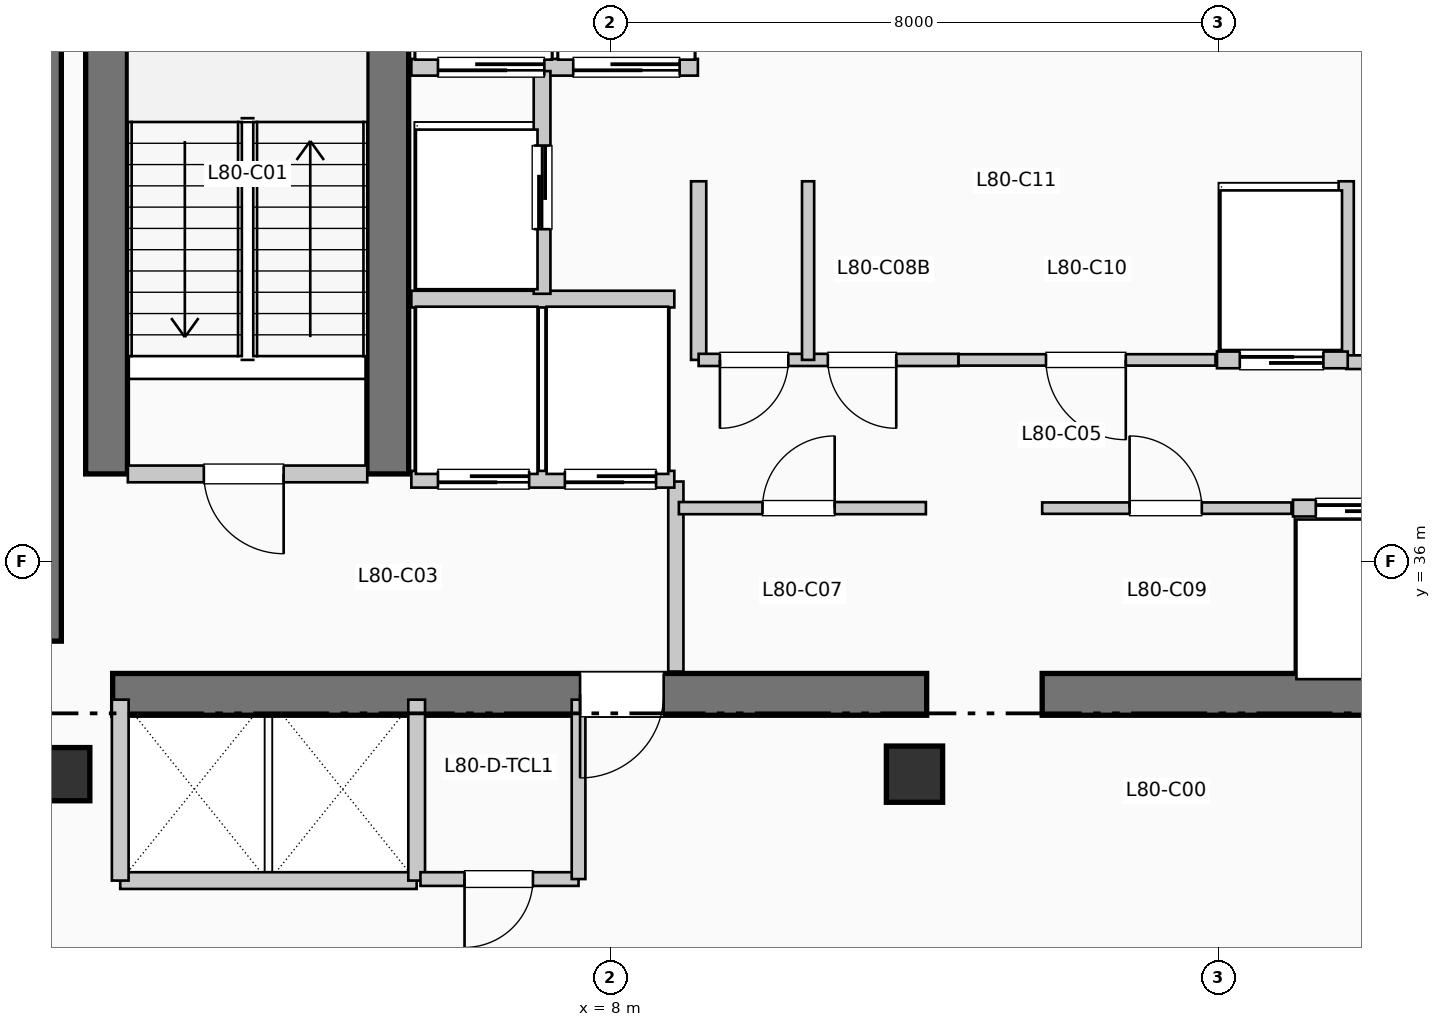
"""IFC4 building model, lengths in metres.
Left out: names, types, materials, properties, quantities, classifications, styles, units other than length and angle.
Written with IfcOpenShell. Run it as: python <this file> out.ifc"""

import sys

from ifc_helpers import new_model, si_unit, direction, frame, frame_2d, origin, origin_2d, place, context, subcontext, project, spatial, rectangle, extrude, element, fill, save


model = new_model("IFC4")
c1 = context("Model", 3, precision=1e-05, world=origin(), true_north=direction((0.0, 1.0)))
c2 = subcontext(c1, "Body", "Model", "MODEL_VIEW")
j1 = project(units=[si_unit("LENGTHUNIT", "METRE"), si_unit("PLANEANGLEUNIT", "RADIAN")], contexts=[c1])
p1 = place(None, origin())
s1 = spatial("IfcSite", under=j1, at=p1, CompositionType="ELEMENT")
p2 = place(p1, origin())
s2 = spatial("IfcBuilding", under=s1, at=p2, CompositionType="ELEMENT")
p3 = place(p2, frame((0.0, 0.0, 327.69)))
s3 = spatial("IfcBuildingStorey", under=s2, at=p3, CompositionType="ELEMENT", Elevation=327.69)
p4 = place(p3, frame((0.5, 34.95, 0.0), z_axis=(0.0, 0.0, 1.0), x_axis=(0.0, 1.0, 0.0)))
e1 = element("IfcWall", 1, at=p4, inside=s3, PredefinedType="SHEAR", context=c2, shape_type="SweptSolid", body=[
    extrude(rectangle(XDim=7.9, YDim=0.55, at=frame_2d((3.95, 0.0))), origin(), (0.0, 0.0, 1.0), 3.96),
])
p5 = place(p3, frame((1.45, 34.25, 0.0), z_axis=(0.0, 0.0, 1.0), x_axis=(1.0, 0.0, 0.0)))
e2 = element("IfcWall", 2, at=p5, inside=s3, PredefinedType="SHEAR", context=c2, shape_type="SweptSolid", body=[
    extrude(rectangle(XDim=10.71, YDim=0.55, at=frame_2d((5.355, 0.0))), origin(), (0.0, 0.0, 1.0), 3.96),
])
p6 = place(p5, frame((7.25, 0.0, 0.0), z_axis=(0.0, 0.0, 1.0), x_axis=(-1.0, 0.0, 0.0)))
e3 = element("IfcOpeningElement", 3, at=p6, cuts=e2, PredefinedType="OPENING", context=c2, shape_type="SweptSolid", body=[
    extrude(rectangle(XDim=1.1, YDim=2.15, at=frame_2d((0.55, 1.075))), frame((0.0, 0.285, 0.0), z_axis=(0.0, -1.0, 0.0), x_axis=(1.0, 0.0, 0.0)), (0.0, 0.0, 1.0), 0.57),
])
p7 = place(p3, frame((13.68, 34.25, 0.0), z_axis=(0.0, 0.0, 1.0), x_axis=(1.0, 0.0, 0.0)))
e4 = element("IfcWall", 4, at=p7, inside=s3, PredefinedType="SHEAR", context=c2, shape_type="SweptSolid", body=[
    extrude(rectangle(XDim=6.12, YDim=0.55, at=frame_2d((3.06, 0.0))), origin(), (0.0, 0.0, 1.0), 3.96),
])
for number, where, z_axis, x_axis in (
    (5, (1.37, 37.15, 0.0), (0.0, 0.0, 1.0), (0.0, 1.0, 0.0)),
    (6, (5.07, 37.15, 0.0), (0.0, 0.0, 1.0), (0.0, 1.0, 0.0)),
):
    element("IfcWall", number, at=place(p3, frame(where, z_axis=z_axis, x_axis=x_axis)), inside=s3, PredefinedType="SHEAR", context=c2, shape_type="SweptSolid", body=[
        extrude(rectangle(XDim=7.89, YDim=0.55, at=frame_2d((3.945, 0.0))), origin(), (0.0, 0.0, 1.0), 3.96),
    ])
p8 = place(p3, frame((0.8, 33.2, 0.0), z_axis=(0.0, 0.0, 1.0), x_axis=(1.0, 0.0, 0.0)))
e7 = element("IfcColumn", 7, at=p8, inside=s3, PredefinedType="COLUMN", context=c2, shape_type="SweptSolid", body=[
    extrude(rectangle(XDim=0.7, YDim=0.7, at=origin_2d()), origin(), (0.0, 0.0, 1.0), 3.96),
])
p9 = place(p3, frame((12.0, 33.2, 0.0), z_axis=(0.0, 0.0, 1.0), x_axis=(1.0, 0.0, 0.0)))
e8 = element("IfcColumn", 8, at=p9, inside=s3, PredefinedType="COLUMN", context=c2, shape_type="SweptSolid", body=[
    extrude(rectangle(XDim=0.74, YDim=0.74, at=origin_2d()), origin(), (0.0, 0.0, 1.0), 3.96),
])
p10 = place(p3, frame((1.65, 37.15, 0.0), z_axis=(0.0, 0.0, 1.0), x_axis=(1.0, 0.0, 0.0)))
e9 = element("IfcWall", 9, at=p10, inside=s3, PredefinedType="PARTITIONING", context=c2, shape_type="SweptSolid", body=[
    extrude(rectangle(XDim=3.15, YDim=0.22, at=frame_2d((1.575, 0.0))), origin(), (0.0, 0.0, 1.0), 3.74),
])
p11 = place(p10, frame((2.05, 0.0, 0.0), z_axis=(0.0, 0.0, 1.0), x_axis=(-1.0, 0.0, 0.0)))
e10 = element("IfcOpeningElement", 10, at=p11, cuts=e9, PredefinedType="OPENING", context=c2, shape_type="SweptSolid", body=[
    extrude(rectangle(XDim=1.05, YDim=2.15, at=frame_2d((0.525, 1.075))), frame((0.0, 0.12, 0.0), z_axis=(0.0, -1.0, 0.0), x_axis=(1.0, 0.0, 0.0)), (0.0, 0.0, 1.0), 0.24),
])
p12 = place(p3, frame((8.86, 34.55, 0.0), z_axis=(0.0, 0.0, 1.0), x_axis=(0.0, 1.0, 0.0)))
e11 = element("IfcWall", 11, at=p12, inside=s3, PredefinedType="PARTITIONING", context=c2, shape_type="SweptSolid", body=[
    extrude(rectangle(XDim=2.5, YDim=0.2, at=frame_2d((1.25, 0.0))), origin(), (0.0, 0.0, 1.0), 3.74),
])
p13 = place(p3, frame((5.38, 37.08, 0.0), z_axis=(0.0, 0.0, 1.0), x_axis=(1.0, 0.0, 0.0)))
e12 = element("IfcWall", 12, at=p13, inside=s3, PredefinedType="PARTITIONING", context=c2, shape_type="SweptSolid", body=[
    extrude(rectangle(XDim=3.46, YDim=0.22, at=frame_2d((1.73, 0.0))), origin(), (0.0, 0.0, 1.0), 3.74),
])
p14 = place(p13, frame((1.55, 0.0, 0.0), z_axis=(0.0, 0.0, 1.0), x_axis=(-1.0, 0.0, 0.0)))
e13 = element("IfcOpeningElement", 13, at=p14, cuts=e12, PredefinedType="OPENING", context=c2, shape_type="SweptSolid", body=[
    extrude(rectangle(XDim=1.2, YDim=2.2, at=frame_2d((0.6, 1.1))), frame((0.0, 0.12, 0.0), z_axis=(0.0, -1.0, 0.0), x_axis=(1.0, 0.0, 0.0)), (0.0, 0.0, 1.0), 0.24),
])
p15 = place(p13, frame((3.22, 0.0, 0.0), z_axis=(0.0, 0.0, 1.0), x_axis=(-1.0, 0.0, 0.0)))
e14 = element("IfcOpeningElement", 14, at=p15, cuts=e12, PredefinedType="OPENING", context=c2, shape_type="SweptSolid", body=[
    extrude(rectangle(XDim=1.2, YDim=2.2, at=frame_2d((0.6, 1.1))), frame((0.0, 0.12, 0.0), z_axis=(0.0, -1.0, 0.0), x_axis=(1.0, 0.0, 0.0)), (0.0, 0.0, 1.0), 0.24),
])
p16 = place(p3, frame((5.38, 39.45, 0.0), z_axis=(0.0, 0.0, 1.0), x_axis=(1.0, 0.0, 0.0)))
e15 = element("IfcWall", 15, at=p16, inside=s3, PredefinedType="PARTITIONING", context=c2, shape_type="SweptSolid", body=[
    extrude(rectangle(XDim=3.46, YDim=0.22, at=frame_2d((1.73, 0.0))), origin(), (0.0, 0.0, 1.0), 3.74),
])
p17 = place(p3, frame((5.38, 42.5, 0.0), z_axis=(0.0, 0.0, 1.0), x_axis=(1.0, 0.0, 0.0)))
e16 = element("IfcWall", 16, at=p17, inside=s3, PredefinedType="PARTITIONING", context=c2, shape_type="SweptSolid", body=[
    extrude(rectangle(XDim=3.77, YDim=0.22, at=frame_2d((1.885, 0.0))), origin(), (0.0, 0.0, 1.0), 3.74),
])
p18 = place(p17, frame((1.75, 0.0, 0.0), z_axis=(0.0, 0.0, 1.0), x_axis=(-1.0, 0.0, 0.0)))
e17 = element("IfcOpeningElement", 17, at=p18, cuts=e16, PredefinedType="OPENING", context=c2, shape_type="SweptSolid", body=[
    extrude(rectangle(XDim=1.4, YDim=2.2, at=frame_2d((0.7, 1.1))), frame((0.0, 0.12, 0.0), z_axis=(0.0, -1.0, 0.0), x_axis=(1.0, 0.0, 0.0)), (0.0, 0.0, 1.0), 0.24),
])
p19 = place(p17, frame((3.53, 0.0, 0.0), z_axis=(0.0, 0.0, 1.0), x_axis=(-1.0, 0.0, 0.0)))
e18 = element("IfcOpeningElement", 18, at=p19, cuts=e16, PredefinedType="OPENING", context=c2, shape_type="SweptSolid", body=[
    extrude(rectangle(XDim=1.4, YDim=2.2, at=frame_2d((0.7, 1.1))), frame((0.0, 0.12, 0.0), z_axis=(0.0, -1.0, 0.0), x_axis=(1.0, 0.0, 0.0)), (0.0, 0.0, 1.0), 0.24),
])
p20 = place(p3, frame((7.1, 39.52, 0.0), z_axis=(0.0, 0.0, 1.0), x_axis=(0.0, 1.0, 0.0)))
e19 = element("IfcWall", 19, at=p20, inside=s3, PredefinedType="PARTITIONING", context=c2, shape_type="SweptSolid", body=[
    extrude(rectangle(XDim=2.93, YDim=0.22, at=frame_2d((1.465, 0.0))), origin(), (0.0, 0.0, 1.0), 3.74),
])
p21 = place(p20, frame((0.85, 0.0, 0.0)))
e20 = element("IfcOpeningElement", 20, at=p21, cuts=e19, PredefinedType="OPENING", context=c2, shape_type="SweptSolid", body=[
    extrude(rectangle(XDim=1.1, YDim=2.2, at=frame_2d((0.55, 1.1))), frame((0.0, 0.12, 0.0), z_axis=(0.0, -1.0, 0.0), x_axis=(1.0, 0.0, 0.0)), (0.0, 0.0, 1.0), 0.24),
])
p22 = place(p3, frame((1.55, 31.8, 0.0), z_axis=(0.0, 0.0, 1.0), x_axis=(1.0, 0.0, 0.0)))
e21 = element("IfcWall", 21, at=p22, inside=s3, PredefinedType="PARTITIONING", context=c2, shape_type="SweptSolid", body=[
    extrude(rectangle(XDim=3.9, YDim=0.22, at=frame_2d((1.95, 0.0))), origin(), (0.0, 0.0, 1.0), 3.74),
])
for number, where, z_axis, x_axis in (
    (22, (1.55, 31.8, 0.0), (0.0, 0.0, 1.0), (0.0, 1.0, 0.0)),
    (23, (5.45, 31.8, 0.0), (0.0, 0.0, 1.0), (0.0, 1.0, 0.0)),
):
    element("IfcWall", number, at=place(p3, frame(where, z_axis=z_axis, x_axis=x_axis)), inside=s3, PredefinedType="PARTITIONING", context=c2, shape_type="SweptSolid", body=[
        extrude(rectangle(XDim=2.38, YDim=0.22, at=frame_2d((1.19, 0.0))), origin(), (0.0, 0.0, 1.0), 3.74),
    ])
for number, where, z_axis, x_axis in (
    (24, (9.16, 38.65, 0.0), (0.0, 0.0, 1.0), (0.0, 1.0, 0.0)),
    (25, (17.68, 38.65, 0.0), (0.0, 0.0, 1.0), (0.0, 1.0, 0.0)),
):
    element("IfcWall", number, at=place(p3, frame(where, z_axis=z_axis, x_axis=x_axis)), inside=s3, PredefinedType="PARTITIONING", context=c2, shape_type="SweptSolid", body=[
        extrude(rectangle(XDim=2.35, YDim=0.2, at=frame_2d((1.175, 0.0))), origin(), (0.0, 0.0, 1.0), 3.74),
    ])
p23 = place(p3, frame((17.68, 38.62, 0.0), z_axis=(0.0, 0.0, 1.0), x_axis=(1.0, 0.0, 0.0)))
e26 = element("IfcWall", 26, at=p23, inside=s3, PredefinedType="PARTITIONING", context=c2, shape_type="SweptSolid", body=[
    extrude(rectangle(XDim=1.84, YDim=0.18, at=frame_2d((0.92, 0.0))), origin(), (0.0, 0.0, 1.0), 3.74),
])
p24 = place(p23, frame((0.24, 0.0, 0.0)))
e27 = element("IfcOpeningElement", 27, at=p24, cuts=e26, PredefinedType="OPENING", context=c2, shape_type="SweptSolid", body=[
    extrude(rectangle(XDim=0.92, YDim=2.1, at=frame_2d((0.46, 1.05))), frame((0.0, 0.1, 0.0), z_axis=(0.0, -1.0, 0.0), x_axis=(1.0, 0.0, 0.0)), (0.0, 0.0, 1.0), 0.2),
])
p25 = place(p3, frame((5.5, 31.82, 0.0), z_axis=(0.0, 0.0, 1.0), x_axis=(1.0, 0.0, 0.0)))
e28 = element("IfcWall", 28, at=p25, inside=s3, PredefinedType="PLUMBINGWALL", context=c2, shape_type="SweptSolid", body=[
    extrude(rectangle(XDim=2.08, YDim=0.18, at=frame_2d((1.04, 0.0))), origin(), (0.0, 0.0, 1.0), 3.74),
])
p26 = place(p25, frame((1.48, 0.0, 0.0), z_axis=(0.0, 0.0, 1.0), x_axis=(-1.0, 0.0, 0.0)))
e29 = element("IfcOpeningElement", 29, at=p26, cuts=e28, PredefinedType="OPENING", context=c2, shape_type="SweptSolid", body=[
    extrude(rectangle(XDim=0.9, YDim=2.1, at=frame_2d((0.45, 1.05))), frame((0.0, 0.1, 0.0), z_axis=(0.0, -1.0, 0.0), x_axis=(1.0, 0.0, 0.0)), (0.0, 0.0, 1.0), 0.2),
])
p27 = place(p3, frame((7.58, 31.82, 0.0), z_axis=(0.0, 0.0, 1.0), x_axis=(0.0, 1.0, 0.0)))
e30 = element("IfcWall", 30, at=p27, inside=s3, PredefinedType="PLUMBINGWALL", context=c2, shape_type="SweptSolid", body=[
    extrude(rectangle(XDim=2.36, YDim=0.18, at=frame_2d((1.18, 0.0))), origin(), (0.0, 0.0, 1.0), 3.74),
])
p28 = place(p3, frame((8.9, 36.7, 0.0), z_axis=(0.0, 0.0, 1.0), x_axis=(1.0, 0.0, 0.0)))
e31 = element("IfcWall", 31, at=p28, inside=s3, PredefinedType="PARTITIONING", context=c2, shape_type="SweptSolid", body=[
    extrude(rectangle(XDim=3.25, YDim=0.16, at=frame_2d((1.625, 0.0))), origin(), (0.0, 0.0, 1.0), 3.74),
])
p29 = place(p28, frame((1.1, 0.0, 0.0)))
e32 = element("IfcOpeningElement", 32, at=p29, cuts=e31, PredefinedType="OPENING", context=c2, shape_type="SweptSolid", body=[
    extrude(rectangle(XDim=0.95, YDim=2.15, at=frame_2d((0.475, 1.075))), frame((0.0, 0.09, 0.0), z_axis=(0.0, -1.0, 0.0), x_axis=(1.0, 0.0, 0.0)), (0.0, 0.0, 1.0), 0.18),
])
p30 = place(p3, frame((9.16, 38.65, 0.0), z_axis=(0.0, 0.0, 1.0), x_axis=(1.0, 0.0, 0.0)))
e33 = element("IfcWall", 33, at=p30, inside=s3, PredefinedType="PARTITIONING", context=c2, shape_type="SweptSolid", body=[
    extrude(rectangle(XDim=3.42, YDim=0.16, at=frame_2d((1.71, 0.0))), origin(), (0.0, 0.0, 1.0), 3.74),
])
p31 = place(p30, frame((1.18, 0.0, 0.0), z_axis=(0.0, 0.0, 1.0), x_axis=(-1.0, 0.0, 0.0)))
e34 = element("IfcOpeningElement", 34, at=p31, cuts=e33, PredefinedType="OPENING", context=c2, shape_type="SweptSolid", body=[
    extrude(rectangle(XDim=0.9, YDim=2.15, at=frame_2d((0.45, 1.075))), frame((0.0, 0.09, 0.0), z_axis=(0.0, -1.0, 0.0), x_axis=(1.0, 0.0, 0.0)), (0.0, 0.0, 1.0), 0.18),
])
p32 = place(p30, frame((2.6, 0.0, 0.0), z_axis=(0.0, 0.0, 1.0), x_axis=(-1.0, 0.0, 0.0)))
e35 = element("IfcOpeningElement", 35, at=p32, cuts=e33, PredefinedType="OPENING", context=c2, shape_type="SweptSolid", body=[
    extrude(rectangle(XDim=0.9, YDim=2.15, at=frame_2d((0.45, 1.075))), frame((0.0, 0.09, 0.0), z_axis=(0.0, -1.0, 0.0), x_axis=(1.0, 0.0, 0.0)), (0.0, 0.0, 1.0), 0.18),
])
p33 = place(p3, frame((10.6, 38.65, 0.0), z_axis=(0.0, 0.0, 1.0), x_axis=(0.0, 1.0, 0.0)))
e36 = element("IfcWall", 36, at=p33, inside=s3, PredefinedType="PARTITIONING", context=c2, shape_type="SweptSolid", body=[
    extrude(rectangle(XDim=2.35, YDim=0.16, at=frame_2d((1.175, 0.0))), origin(), (0.0, 0.0, 1.0), 3.74),
])
p34 = place(p3, frame((13.68, 36.7, 0.0), z_axis=(0.0, 0.0, 1.0), x_axis=(1.0, 0.0, 0.0)))
e37 = element("IfcWall", 37, at=p34, inside=s3, PredefinedType="PARTITIONING", context=c2, shape_type="SweptSolid", body=[
    extrude(rectangle(XDim=3.28, YDim=0.15, at=frame_2d((1.64, 0.0))), origin(), (0.0, 0.0, 1.0), 3.74),
])
p35 = place(p34, frame((1.15, 0.0, 0.0)))
e38 = element("IfcOpeningElement", 38, at=p35, cuts=e37, PredefinedType="OPENING", context=c2, shape_type="SweptSolid", body=[
    extrude(rectangle(XDim=0.95, YDim=2.15, at=frame_2d((0.475, 1.075))), frame((0.0, 0.085, 0.0), z_axis=(0.0, -1.0, 0.0), x_axis=(1.0, 0.0, 0.0)), (0.0, 0.0, 1.0), 0.17),
])
p36 = place(p3, frame((12.58, 38.65, 0.0), z_axis=(0.0, 0.0, 1.0), x_axis=(1.0, 0.0, 0.0)))
e39 = element("IfcWall", 39, at=p36, inside=s3, PredefinedType="PARTITIONING", context=c2, shape_type="SweptSolid", body=[
    extrude(rectangle(XDim=3.38, YDim=0.15, at=frame_2d((1.69, 0.0))), origin(), (0.0, 0.0, 1.0), 3.74),
])
p37 = place(p36, frame((2.2, 0.0, 0.0), z_axis=(0.0, 0.0, 1.0), x_axis=(-1.0, 0.0, 0.0)))
e40 = element("IfcOpeningElement", 40, at=p37, cuts=e39, PredefinedType="OPENING", context=c2, shape_type="SweptSolid", body=[
    extrude(rectangle(XDim=1.05, YDim=2.15, at=frame_2d((0.525, 1.075))), frame((0.0, 0.085, 0.0), z_axis=(0.0, -1.0, 0.0), x_axis=(1.0, 0.0, 0.0)), (0.0, 0.0, 1.0), 0.17),
])
p38 = place(p3, frame((16.98, 36.7, 0.0), z_axis=(0.0, 0.0, 1.0), x_axis=(1.0, 0.0, 0.0)))
e41 = element("IfcWall", 41, at=p38, inside=s3, PredefinedType="PARTITIONING", context=c2, shape_type="SweptSolid", body=[
    extrude(rectangle(XDim=1.7, YDim=0.22, at=frame_2d((0.85, 0.0))), origin(), (0.0, 0.0, 1.0), 3.74),
])
p39 = place(p38, frame((0.3, 0.0, 0.0)))
e42 = element("IfcOpeningElement", 42, at=p39, cuts=e41, PredefinedType="OPENING", context=c2, shape_type="SweptSolid", body=[
    extrude(rectangle(XDim=1.1, YDim=2.2, at=frame_2d((0.55, 1.1))), frame((0.0, 0.12, 0.0), z_axis=(0.0, -1.0, 0.0), x_axis=(1.0, 0.0, 0.0)), (0.0, 0.0, 1.0), 0.24),
])
p40 = place(p3, frame((15.98, 38.65, 0.0), z_axis=(0.0, 0.0, 1.0), x_axis=(1.0, 0.0, 0.0)))
e43 = element("IfcWall", 43, at=p40, inside=s3, PredefinedType="PARTITIONING", context=c2, shape_type="SweptSolid", body=[
    extrude(rectangle(XDim=1.72, YDim=0.22, at=frame_2d((0.86, 0.0))), origin(), (0.0, 0.0, 1.0), 3.74),
])
p41 = place(p40, frame((0.3, 0.0, 0.0)))
e44 = element("IfcOpeningElement", 44, at=p41, cuts=e43, PredefinedType="OPENING", context=c2, shape_type="SweptSolid", body=[
    extrude(rectangle(XDim=1.1, YDim=2.2, at=frame_2d((0.55, 1.1))), frame((0.0, 0.12, 0.0), z_axis=(0.0, -1.0, 0.0), x_axis=(1.0, 0.0, 0.0)), (0.0, 0.0, 1.0), 0.24),
])
p42 = place(p11, origin())
e45 = element("IfcDoor", 45, at=p42, inside=s3, OperationType="SINGLE_SWING_RIGHT", PredefinedType="DOOR", context=c2, shape_type="SweptSolid", body=[
    extrude(rectangle(XDim=1.05, YDim=2.15, at=frame_2d((0.525, 1.075))), frame((0.0, 0.025, 0.0), z_axis=(0.0, -1.0, 0.0), x_axis=(1.0, 0.0, 0.0)), (0.0, 0.0, 1.0), 0.05),
])
fill(e10, e45)
p43 = place(p6, origin())
e46 = element("IfcDoor", 46, at=p43, inside=s3, OperationType="SINGLE_SWING_LEFT", PredefinedType="DOOR", context=c2, shape_type="SweptSolid", body=[
    extrude(rectangle(XDim=1.1, YDim=2.15, at=frame_2d((0.55, 1.075))), frame((0.0, 0.025, 0.0), z_axis=(0.0, -1.0, 0.0), x_axis=(1.0, 0.0, 0.0)), (0.0, 0.0, 1.0), 0.05),
])
fill(e3, e46)
p44 = place(p14, origin())
e47 = element("IfcDoor", 47, at=p44, inside=s3, OperationType="SLIDING_TO_RIGHT", PredefinedType="DOOR", context=c2, shape_type="SweptSolid", body=[
    extrude(rectangle(XDim=1.2, YDim=2.2, at=frame_2d((0.6, 1.1))), frame((0.0, 0.025, 0.0), z_axis=(0.0, -1.0, 0.0), x_axis=(1.0, 0.0, 0.0)), (0.0, 0.0, 1.0), 0.05),
])
fill(e13, e47)
p45 = place(p15, origin())
e48 = element("IfcDoor", 48, at=p45, inside=s3, OperationType="SLIDING_TO_RIGHT", PredefinedType="DOOR", context=c2, shape_type="SweptSolid", body=[
    extrude(rectangle(XDim=1.2, YDim=2.2, at=frame_2d((0.6, 1.1))), frame((0.0, 0.025, 0.0), z_axis=(0.0, -1.0, 0.0), x_axis=(1.0, 0.0, 0.0)), (0.0, 0.0, 1.0), 0.05),
])
fill(e14, e48)
p46 = place(p18, origin())
e49 = element("IfcDoor", 49, at=p46, inside=s3, OperationType="SLIDING_TO_LEFT", PredefinedType="DOOR", context=c2, shape_type="SweptSolid", body=[
    extrude(rectangle(XDim=1.4, YDim=2.2, at=frame_2d((0.7, 1.1))), frame((0.0, 0.025, 0.0), z_axis=(0.0, -1.0, 0.0), x_axis=(1.0, 0.0, 0.0)), (0.0, 0.0, 1.0), 0.05),
])
fill(e17, e49)
p47 = place(p19, origin())
e50 = element("IfcDoor", 50, at=p47, inside=s3, OperationType="SLIDING_TO_LEFT", PredefinedType="DOOR", context=c2, shape_type="SweptSolid", body=[
    extrude(rectangle(XDim=1.4, YDim=2.2, at=frame_2d((0.7, 1.1))), frame((0.0, 0.025, 0.0), z_axis=(0.0, -1.0, 0.0), x_axis=(1.0, 0.0, 0.0)), (0.0, 0.0, 1.0), 0.05),
])
fill(e18, e50)
p48 = place(p21, origin())
e51 = element("IfcDoor", 51, at=p48, inside=s3, OperationType="SLIDING_TO_LEFT", PredefinedType="DOOR", context=c2, shape_type="SweptSolid", body=[
    extrude(rectangle(XDim=1.1, YDim=2.2, at=frame_2d((0.55, 1.1))), frame((0.0, 0.025, 0.0), z_axis=(0.0, -1.0, 0.0), x_axis=(1.0, 0.0, 0.0)), (0.0, 0.0, 1.0), 0.05),
])
fill(e20, e51)
p49 = place(p26, origin())
e52 = element("IfcDoor", 52, at=p49, inside=s3, OperationType="SINGLE_SWING_LEFT", PredefinedType="DOOR", context=c2, shape_type="SweptSolid", body=[
    extrude(rectangle(XDim=0.9, YDim=2.1, at=frame_2d((0.45, 1.05))), frame((0.0, 0.025, 0.0), z_axis=(0.0, -1.0, 0.0), x_axis=(1.0, 0.0, 0.0)), (0.0, 0.0, 1.0), 0.05),
])
fill(e29, e52)
p50 = place(p29, origin())
e53 = element("IfcDoor", 53, at=p50, inside=s3, OperationType="SINGLE_SWING_RIGHT", PredefinedType="DOOR", context=c2, shape_type="SweptSolid", body=[
    extrude(rectangle(XDim=0.95, YDim=2.15, at=frame_2d((0.475, 1.075))), frame((0.0, 0.025, 0.0), z_axis=(0.0, -1.0, 0.0), x_axis=(1.0, 0.0, 0.0)), (0.0, 0.0, 1.0), 0.05),
])
fill(e32, e53)
p51 = place(p31, origin())
e54 = element("IfcDoor", 54, at=p51, inside=s3, OperationType="SINGLE_SWING_LEFT", PredefinedType="DOOR", context=c2, shape_type="SweptSolid", body=[
    extrude(rectangle(XDim=0.9, YDim=2.15, at=frame_2d((0.45, 1.075))), frame((0.0, 0.025, 0.0), z_axis=(0.0, -1.0, 0.0), x_axis=(1.0, 0.0, 0.0)), (0.0, 0.0, 1.0), 0.05),
])
fill(e34, e54)
p52 = place(p32, origin())
e55 = element("IfcDoor", 55, at=p52, inside=s3, OperationType="SINGLE_SWING_RIGHT", PredefinedType="DOOR", context=c2, shape_type="SweptSolid", body=[
    extrude(rectangle(XDim=0.9, YDim=2.15, at=frame_2d((0.45, 1.075))), frame((0.0, 0.025, 0.0), z_axis=(0.0, -1.0, 0.0), x_axis=(1.0, 0.0, 0.0)), (0.0, 0.0, 1.0), 0.05),
])
fill(e35, e55)
p53 = place(p35, origin())
e56 = element("IfcDoor", 56, at=p53, inside=s3, OperationType="SINGLE_SWING_LEFT", PredefinedType="DOOR", context=c2, shape_type="SweptSolid", body=[
    extrude(rectangle(XDim=0.95, YDim=2.15, at=frame_2d((0.475, 1.075))), frame((0.0, 0.025, 0.0), z_axis=(0.0, -1.0, 0.0), x_axis=(1.0, 0.0, 0.0)), (0.0, 0.0, 1.0), 0.05),
])
fill(e38, e56)
p54 = place(p37, origin())
e57 = element("IfcDoor", 57, at=p54, inside=s3, OperationType="SINGLE_SWING_RIGHT", PredefinedType="DOOR", context=c2, shape_type="SweptSolid", body=[
    extrude(rectangle(XDim=1.05, YDim=2.15, at=frame_2d((0.525, 1.075))), frame((0.0, 0.025, 0.0), z_axis=(0.0, -1.0, 0.0), x_axis=(1.0, 0.0, 0.0)), (0.0, 0.0, 1.0), 0.05),
])
fill(e40, e57)
p55 = place(p39, origin())
e58 = element("IfcDoor", 58, at=p55, inside=s3, OperationType="SLIDING_TO_LEFT", PredefinedType="DOOR", context=c2, shape_type="SweptSolid", body=[
    extrude(rectangle(XDim=1.1, YDim=2.2, at=frame_2d((0.55, 1.1))), frame((0.0, 0.025, 0.0), z_axis=(0.0, -1.0, 0.0), x_axis=(1.0, 0.0, 0.0)), (0.0, 0.0, 1.0), 0.05),
])
fill(e42, e58)
p56 = place(p41, origin())
e59 = element("IfcDoor", 59, at=p56, inside=s3, OperationType="SLIDING_TO_LEFT", PredefinedType="DOOR", context=c2, shape_type="SweptSolid", body=[
    extrude(rectangle(XDim=1.1, YDim=2.2, at=frame_2d((0.55, 1.1))), frame((0.0, 0.025, 0.0), z_axis=(0.0, -1.0, 0.0), x_axis=(1.0, 0.0, 0.0)), (0.0, 0.0, 1.0), 0.05),
])
fill(e44, e59)
save(model, sys.argv[1])
